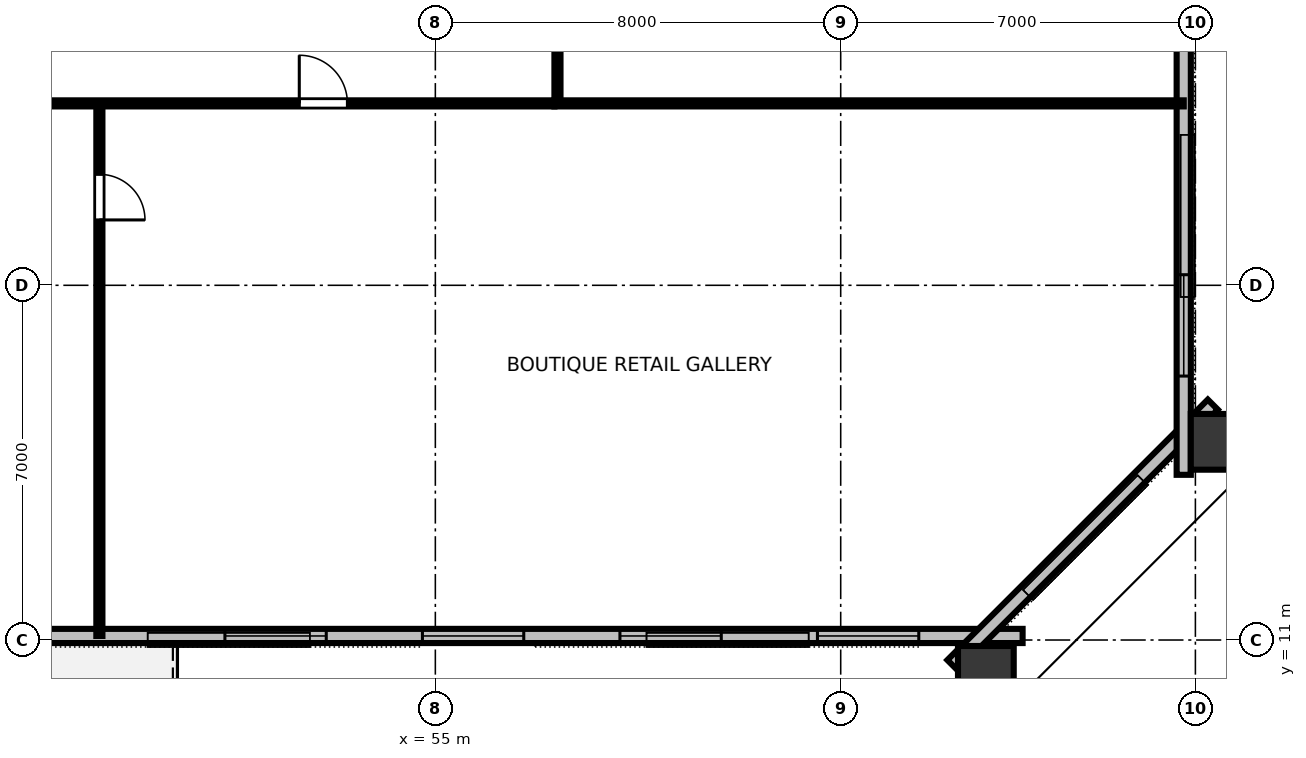
"""IFC4 building model, lengths in metres.
Left out: names, types, materials, properties, quantities, classifications, styles, units other than length and angle.
Written with IfcOpenShell. Run it as: python <this file> out.ifc"""

import sys

from ifc_helpers import new_model, si_unit, direction, frame, frame_2d, origin, origin_2d, place, context, subcontext, project, spatial, rectangle, hollow_rectangle, extrude, element, fill, save


model = new_model("IFC4")
c1 = context("Model", 3, precision=1e-05, world=origin(), true_north=direction((0.0, 1.0)))
c2 = subcontext(c1, "Body", "Model", "MODEL_VIEW")
j1 = project(units=[si_unit("LENGTHUNIT", "METRE"), si_unit("PLANEANGLEUNIT", "RADIAN")], contexts=[c1])
p1 = place(None, origin())
s1 = spatial("IfcSite", under=j1, at=p1, CompositionType="ELEMENT")
p2 = place(p1, origin())
s2 = spatial("IfcBuilding", under=s1, at=p2, CompositionType="ELEMENT")
p3 = place(p2, frame((0.0, 0.0, 46.0)))
s3 = spatial("IfcBuildingStorey", under=s2, at=p3, CompositionType="ELEMENT", Elevation=46.0)
p4 = place(p3, frame((65.865, 10.232, 0.0), z_axis=(0.047892071217, -0.094241724682, 0.994396725077), x_axis=(0.891490015287, 0.453040343284, 0.0)))
e1 = element("IfcColumn", 1, at=p4, inside=s3, PredefinedType="COLUMN", context=c2, shape_type="SweptSolid", body=[
    extrude(hollow_rectangle(XDim=1.1, YDim=1.3, WallThickness=0.07, at=origin_2d()), origin(), (0.0, 0.0, 1.0), 3.166),
])
p5 = place(p3, frame((70.559, 14.911, 0.0), z_axis=(0.109942970926, -0.032204738505, 0.993416024615), x_axis=(-0.953356995981, 0.279259442411, 0.114562655514)))
e2 = element("IfcColumn", 2, at=p5, inside=s3, PredefinedType="COLUMN", context=c2, shape_type="SweptSolid", body=[
    extrude(hollow_rectangle(XDim=1.1, YDim=1.3, WallThickness=0.07, at=origin_2d()), origin(), (0.0, 0.0, 1.0), 3.169),
])
p6 = place(p3, frame((25.41, 11.08, 0.0), z_axis=(0.0, 0.0, 1.0), x_axis=(1.0, 0.0, 0.0)))
e3 = element("IfcWall", 3, at=p6, inside=s3, PredefinedType="STANDARD", context=c2, shape_type="SweptSolid", body=[
    extrude(rectangle(XDim=41.18, YDim=0.28, at=frame_2d((20.59, 0.0))), origin(), (0.0, 0.0, 1.0), 3.15),
])
p7 = place(p6, frame((16.91, 0.0, 0.0)))
e4 = element("IfcOpeningElement", 4, at=p7, cuts=e3, PredefinedType="OPENING", context=c2, shape_type="SweptSolid", body=[
    extrude(rectangle(XDim=1.4, YDim=2.15, at=frame_2d((0.7, 1.075))), frame((0.0, 0.15, 0.0), z_axis=(0.0, -1.0, 0.0), x_axis=(1.0, 0.0, 0.0)), (0.0, 0.0, 1.0), 0.3),
])
p8 = place(p6, frame((2.049, 0.0, 0.8)))
e5 = element("IfcOpeningElement", 5, at=p8, cuts=e3, PredefinedType="OPENING", context=c2, shape_type="SweptSolid", body=[
    extrude(rectangle(XDim=2.0, YDim=1.95, at=frame_2d((1.0, 0.975))), frame((0.0, 0.15, 0.0), z_axis=(0.0, -1.0, 0.0), x_axis=(1.0, 0.0, 0.0)), (0.0, 0.0, 1.0), 0.3),
])
p9 = place(p6, frame((5.947, 0.0, 0.8)))
e6 = element("IfcOpeningElement", 6, at=p9, cuts=e3, PredefinedType="OPENING", context=c2, shape_type="SweptSolid", body=[
    extrude(rectangle(XDim=2.0, YDim=1.95, at=frame_2d((1.0, 0.975))), frame((0.0, 0.15, 0.0), z_axis=(0.0, -1.0, 0.0), x_axis=(1.0, 0.0, 0.0)), (0.0, 0.0, 1.0), 0.3),
])
p10 = place(p6, frame((9.845, 0.0, 0.8)))
e7 = element("IfcOpeningElement", 7, at=p10, cuts=e3, PredefinedType="OPENING", context=c2, shape_type="SweptSolid", body=[
    extrude(rectangle(XDim=2.0, YDim=1.95, at=frame_2d((1.0, 0.975))), frame((0.0, 0.15, 0.0), z_axis=(0.0, -1.0, 0.0), x_axis=(1.0, 0.0, 0.0)), (0.0, 0.0, 1.0), 0.3),
])
p11 = place(p6, frame((25.437, 0.0, 0.8)))
e8 = element("IfcOpeningElement", 8, at=p11, cuts=e3, PredefinedType="OPENING", context=c2, shape_type="SweptSolid", body=[
    extrude(rectangle(XDim=2.0, YDim=1.95, at=frame_2d((1.0, 0.975))), frame((0.0, 0.15, 0.0), z_axis=(0.0, -1.0, 0.0), x_axis=(1.0, 0.0, 0.0)), (0.0, 0.0, 1.0), 0.3),
])
p12 = place(p6, frame((29.335, 0.0, 0.8)))
e9 = element("IfcOpeningElement", 9, at=p12, cuts=e3, PredefinedType="OPENING", context=c2, shape_type="SweptSolid", body=[
    extrude(rectangle(XDim=2.0, YDim=1.95, at=frame_2d((1.0, 0.975))), frame((0.0, 0.15, 0.0), z_axis=(0.0, -1.0, 0.0), x_axis=(1.0, 0.0, 0.0)), (0.0, 0.0, 1.0), 0.3),
])
p13 = place(p6, frame((33.233, 0.0, 0.8)))
e10 = element("IfcOpeningElement", 10, at=p13, cuts=e3, PredefinedType="OPENING", context=c2, shape_type="SweptSolid", body=[
    extrude(rectangle(XDim=2.0, YDim=1.95, at=frame_2d((1.0, 0.975))), frame((0.0, 0.15, 0.0), z_axis=(0.0, -1.0, 0.0), x_axis=(1.0, 0.0, 0.0)), (0.0, 0.0, 1.0), 0.3),
])
p14 = place(p6, frame((37.131, 0.0, 0.8)))
e11 = element("IfcOpeningElement", 11, at=p14, cuts=e3, PredefinedType="OPENING", context=c2, shape_type="SweptSolid", body=[
    extrude(rectangle(XDim=2.0, YDim=1.95, at=frame_2d((1.0, 0.975))), frame((0.0, 0.15, 0.0), z_axis=(0.0, -1.0, 0.0), x_axis=(1.0, 0.0, 0.0)), (0.0, 0.0, 1.0), 0.3),
])
p15 = place(p3, frame((65.205, 10.506, 0.0), z_axis=(0.0, 0.0, 1.0), x_axis=(0.707106781187, 0.707106781187, 0.0)))
e12 = element("IfcWall", 12, at=p15, inside=s3, PredefinedType="STANDARD", context=c2, shape_type="SweptSolid", body=[
    extrude(rectangle(XDim=7.268, YDim=0.28, at=frame_2d((3.634, 0.0))), origin(), (0.0, 0.0, 1.0), 3.15),
])
p16 = place(p3, frame((69.77, 14.26, 0.0), z_axis=(0.0, 0.0, 1.0), x_axis=(0.0, 1.0, 0.0)))
e13 = element("IfcWall", 13, at=p16, inside=s3, PredefinedType="STANDARD", context=c2, shape_type="SweptSolid", body=[
    extrude(rectangle(XDim=35.48, YDim=0.28, at=frame_2d((17.74, 0.0))), origin(), (0.0, 0.0, 1.0), 3.15),
])
p17 = place(p16, frame((1.949, 0.0, 0.8)))
e14 = element("IfcOpeningElement", 14, at=p17, cuts=e13, PredefinedType="OPENING", context=c2, shape_type="SweptSolid", body=[
    extrude(rectangle(XDim=2.0, YDim=1.95, at=frame_2d((1.0, 0.975))), frame((0.0, 0.15, 0.0), z_axis=(0.0, -1.0, 0.0), x_axis=(1.0, 0.0, 0.0)), (0.0, 0.0, 1.0), 0.3),
])
p18 = place(p16, frame((9.344, 0.0, 0.8)))
e15 = element("IfcOpeningElement", 15, at=p18, cuts=e13, PredefinedType="OPENING", context=c2, shape_type="SweptSolid", body=[
    extrude(rectangle(XDim=2.0, YDim=1.95, at=frame_2d((1.0, 0.975))), frame((0.0, 0.15, 0.0), z_axis=(0.0, -1.0, 0.0), x_axis=(1.0, 0.0, 0.0)), (0.0, 0.0, 1.0), 0.3),
])
p19 = place(p16, frame((13.042, 0.0, 0.8)))
e16 = element("IfcOpeningElement", 16, at=p19, cuts=e13, PredefinedType="OPENING", context=c2, shape_type="SweptSolid", body=[
    extrude(rectangle(XDim=2.0, YDim=1.95, at=frame_2d((1.0, 0.975))), frame((0.0, 0.15, 0.0), z_axis=(0.0, -1.0, 0.0), x_axis=(1.0, 0.0, 0.0)), (0.0, 0.0, 1.0), 0.3),
])
p20 = place(p16, frame((20.438, 0.0, 0.8)))
e17 = element("IfcOpeningElement", 17, at=p20, cuts=e13, PredefinedType="OPENING", context=c2, shape_type="SweptSolid", body=[
    extrude(rectangle(XDim=2.0, YDim=1.95, at=frame_2d((1.0, 0.975))), frame((0.0, 0.15, 0.0), z_axis=(0.0, -1.0, 0.0), x_axis=(1.0, 0.0, 0.0)), (0.0, 0.0, 1.0), 0.3),
])
p21 = place(p16, frame((24.135, 0.0, 0.8)))
e18 = element("IfcOpeningElement", 18, at=p21, cuts=e13, PredefinedType="OPENING", context=c2, shape_type="SweptSolid", body=[
    extrude(rectangle(XDim=2.0, YDim=1.95, at=frame_2d((1.0, 0.975))), frame((0.0, 0.15, 0.0), z_axis=(0.0, -1.0, 0.0), x_axis=(1.0, 0.0, 0.0)), (0.0, 0.0, 1.0), 0.3),
])
p22 = place(p16, frame((31.531, 0.0, 0.8)))
e19 = element("IfcOpeningElement", 19, at=p22, cuts=e13, PredefinedType="OPENING", context=c2, shape_type="SweptSolid", body=[
    extrude(rectangle(XDim=2.0, YDim=1.95, at=frame_2d((1.0, 0.975))), frame((0.0, 0.15, 0.0), z_axis=(0.0, -1.0, 0.0), x_axis=(1.0, 0.0, 0.0)), (0.0, 0.0, 1.0), 0.3),
])
p23 = place(p3, frame((48.37, 21.59, 0.0), z_axis=(0.0, 0.0, 1.0), x_axis=(0.0, -1.0, 0.0)))
e20 = element("IfcWall", 20, at=p23, inside=s3, PredefinedType="PARTITIONING", context=c2, shape_type="SweptSolid", body=[
    extrude(rectangle(XDim=10.51, YDim=0.12, at=frame_2d((5.255, 0.0))), origin(), (0.0, 0.0, 1.0), 2.43),
])
p24 = place(p23, frame((1.4, 0.0, 0.0)))
e21 = element("IfcOpeningElement", 21, at=p24, cuts=e20, PredefinedType="OPENING", context=c2, shape_type="SweptSolid", body=[
    extrude(rectangle(XDim=0.9, YDim=2.15, at=frame_2d((0.45, 1.075))), frame((0.0, 0.07, 0.0), z_axis=(0.0, -1.0, 0.0), x_axis=(1.0, 0.0, 0.0)), (0.0, 0.0, 1.0), 0.14),
])
p25 = place(p3, frame((34.65, 21.59, 0.0), z_axis=(0.0, 0.0, 1.0), x_axis=(1.0, 0.0, 0.0)))
e22 = element("IfcWall", 22, at=p25, inside=s3, PredefinedType="PARTITIONING", context=c2, shape_type="SweptSolid", body=[
    extrude(rectangle(XDim=22.7, YDim=0.12, at=frame_2d((11.35, 0.0))), origin(), (0.0, 0.0, 1.0), 2.43),
])
p26 = place(p25, frame((2.959, 0.0, 0.0)))
e23 = element("IfcOpeningElement", 23, at=p26, cuts=e22, PredefinedType="OPENING", context=c2, shape_type="SweptSolid", body=[
    extrude(rectangle(XDim=0.95, YDim=2.15, at=frame_2d((0.475, 1.075))), frame((0.0, 0.07, 0.0), z_axis=(0.0, -1.0, 0.0), x_axis=(1.0, 0.0, 0.0)), (0.0, 0.0, 1.0), 0.14),
])
p27 = place(p25, frame((7.709, 0.0, 0.0)))
e24 = element("IfcOpeningElement", 24, at=p27, cuts=e22, PredefinedType="OPENING", context=c2, shape_type="SweptSolid", body=[
    extrude(rectangle(XDim=0.95, YDim=2.15, at=frame_2d((0.475, 1.075))), frame((0.0, 0.07, 0.0), z_axis=(0.0, -1.0, 0.0), x_axis=(1.0, 0.0, 0.0)), (0.0, 0.0, 1.0), 0.14),
])
p28 = place(p25, frame((11.204, 0.0, 0.0)))
e25 = element("IfcOpeningElement", 25, at=p28, cuts=e22, PredefinedType="OPENING", context=c2, shape_type="SweptSolid", body=[
    extrude(rectangle(XDim=0.95, YDim=2.15, at=frame_2d((0.475, 1.075))), frame((0.0, 0.07, 0.0), z_axis=(0.0, -1.0, 0.0), x_axis=(1.0, 0.0, 0.0)), (0.0, 0.0, 1.0), 0.14),
])
p29 = place(p25, frame((17.665, 0.0, 0.0)))
e26 = element("IfcOpeningElement", 26, at=p29, cuts=e22, PredefinedType="OPENING", context=c2, shape_type="SweptSolid", body=[
    extrude(rectangle(XDim=0.95, YDim=2.15, at=frame_2d((0.475, 1.075))), frame((0.0, 0.07, 0.0), z_axis=(0.0, -1.0, 0.0), x_axis=(1.0, 0.0, 0.0)), (0.0, 0.0, 1.0), 0.14),
])
p30 = place(p3, frame((57.41, 21.65, 0.0), z_axis=(0.0, 0.0, 1.0), x_axis=(0.0, 1.0, 0.0)))
e27 = element("IfcWall", 27, at=p30, inside=s3, PredefinedType="PARTITIONING", context=c2, shape_type="SweptSolid", body=[
    extrude(rectangle(XDim=20.7, YDim=0.12, at=frame_2d((10.35, 0.0))), origin(), (0.0, 0.0, 1.0), 2.43),
])
p31 = place(p30, frame((9.875, 0.0, 0.0)))
e28 = element("IfcOpeningElement", 28, at=p31, cuts=e27, PredefinedType="OPENING", context=c2, shape_type="SweptSolid", body=[
    extrude(rectangle(XDim=0.95, YDim=2.15, at=frame_2d((0.475, 1.075))), frame((0.0, 0.07, 0.0), z_axis=(0.0, -1.0, 0.0), x_axis=(1.0, 0.0, 0.0)), (0.0, 0.0, 1.0), 0.14),
])
p32 = place(p3, frame((57.35, 21.59, 0.0), z_axis=(0.0, 0.0, 1.0), x_axis=(1.0, 0.0, 0.0)))
e29 = element("IfcWall", 29, at=p32, inside=s3, PredefinedType="PARTITIONING", context=c2, shape_type="SweptSolid", body=[
    extrude(rectangle(XDim=12.42, YDim=0.12, at=frame_2d((6.21, 0.0))), origin(), (0.0, 0.0, 1.0), 2.43),
])
p33 = place(p11, origin())
e30 = element("IfcWindow", 30, at=p33, inside=s3, PartitioningType="SINGLE_PANEL", PredefinedType="WINDOW", context=c2, shape_type="SweptSolid", body=[
    extrude(rectangle(XDim=2.0, YDim=1.95, at=frame_2d((1.0, 0.975))), frame((0.0, 0.03, 0.0), z_axis=(0.0, -1.0, 0.0), x_axis=(1.0, 0.0, 0.0)), (0.0, 0.0, 1.0), 0.06),
])
fill(e8, e30)
p34 = place(p12, origin())
e31 = element("IfcWindow", 31, at=p34, inside=s3, PartitioningType="SINGLE_PANEL", PredefinedType="WINDOW", context=c2, shape_type="SweptSolid", body=[
    extrude(rectangle(XDim=2.0, YDim=1.95, at=frame_2d((1.0, 0.975))), frame((0.0, 0.03, 0.0), z_axis=(0.0, -1.0, 0.0), x_axis=(1.0, 0.0, 0.0)), (0.0, 0.0, 1.0), 0.06),
])
fill(e9, e31)
p35 = place(p13, origin())
e32 = element("IfcWindow", 32, at=p35, inside=s3, PartitioningType="SINGLE_PANEL", PredefinedType="WINDOW", context=c2, shape_type="SweptSolid", body=[
    extrude(rectangle(XDim=2.0, YDim=1.95, at=frame_2d((1.0, 0.975))), frame((0.0, 0.03, 0.0), z_axis=(0.0, -1.0, 0.0), x_axis=(1.0, 0.0, 0.0)), (0.0, 0.0, 1.0), 0.06),
])
fill(e10, e32)
p36 = place(p14, origin())
e33 = element("IfcWindow", 33, at=p36, inside=s3, PartitioningType="SINGLE_PANEL", PredefinedType="WINDOW", context=c2, shape_type="SweptSolid", body=[
    extrude(rectangle(XDim=2.0, YDim=1.95, at=frame_2d((1.0, 0.975))), frame((0.0, 0.03, 0.0), z_axis=(0.0, -1.0, 0.0), x_axis=(1.0, 0.0, 0.0)), (0.0, 0.0, 1.0), 0.06),
])
fill(e11, e33)
p37 = place(p17, origin())
e34 = element("IfcWindow", 34, at=p37, inside=s3, PartitioningType="SINGLE_PANEL", PredefinedType="WINDOW", context=c2, shape_type="SweptSolid", body=[
    extrude(rectangle(XDim=2.0, YDim=1.95, at=frame_2d((1.0, 0.975))), frame((0.0, 0.03, 0.0), z_axis=(0.0, -1.0, 0.0), x_axis=(1.0, 0.0, 0.0)), (0.0, 0.0, 1.0), 0.06),
])
fill(e14, e34)
p38 = place(p24, origin())
e35 = element("IfcDoor", 35, at=p38, inside=s3, OperationType="SINGLE_SWING_RIGHT", PredefinedType="DOOR", context=c2, shape_type="SweptSolid", body=[
    extrude(rectangle(XDim=0.9, YDim=2.15, at=frame_2d((0.45, 1.075))), frame((0.0, 0.025, 0.0), z_axis=(0.0, -1.0, 0.0), x_axis=(1.0, 0.0, 0.0)), (0.0, 0.0, 1.0), 0.05),
])
fill(e21, e35)
p39 = place(p29, origin())
e36 = element("IfcDoor", 36, at=p39, inside=s3, OperationType="SINGLE_SWING_LEFT", PredefinedType="DOOR", context=c2, shape_type="SweptSolid", body=[
    extrude(rectangle(XDim=0.95, YDim=2.15, at=frame_2d((0.475, 1.075))), frame((0.0, 0.025, 0.0), z_axis=(0.0, -1.0, 0.0), x_axis=(1.0, 0.0, 0.0)), (0.0, 0.0, 1.0), 0.05),
])
fill(e26, e36)
save(model, sys.argv[1])
